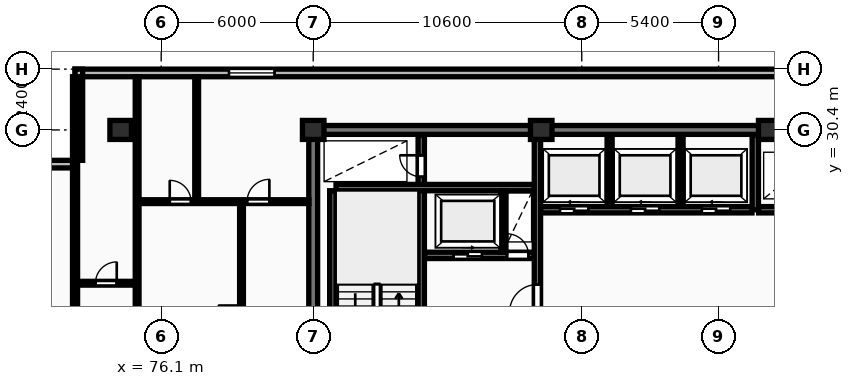
"""IFC4 building model, lengths in metres.
Left out: names, types, materials, properties, quantities, classifications, styles, units other than length and angle.
Written with IfcOpenShell. Run it as: python <this file> out.ifc"""

import sys

from ifc_helpers import new_model, si_unit, direction, frame, frame_2d, origin, origin_2d, place, context, subcontext, project, spatial, rectangle, extrude, element, fill, save


model = new_model("IFC4")
c1 = context("Model", 3, precision=1e-05, world=origin(), true_north=direction((0.0, 1.0)))
c2 = subcontext(c1, "Body", "Model", "MODEL_VIEW")
j1 = project(units=[si_unit("LENGTHUNIT", "METRE"), si_unit("PLANEANGLEUNIT", "RADIAN")], contexts=[c1])
p1 = place(None, origin())
s1 = spatial("IfcSite", under=j1, at=p1, CompositionType="ELEMENT")
p2 = place(p1, origin())
s2 = spatial("IfcBuilding", under=s1, at=p2, CompositionType="ELEMENT")
p3 = place(p2, frame((0.0, 0.0, 80.8)))
s3 = spatial("IfcBuildingStorey", under=s2, at=p3, CompositionType="ELEMENT", Elevation=80.8)
for number, where, z_axis, x_axis in (
    (1, (74.5, 30.4, 0.0), (0.0, 0.0, 1.0), (1.0, 0.0, 0.0)),
    (2, (82.1, 30.4, 0.0), (0.0, 0.0, 1.0), (1.0, 0.0, 0.0)),
    (3, (91.1, 30.4, 0.0), (0.0, 0.0, 1.0), (1.0, 0.0, 0.0)),
    (4, (100.1, 30.4, 0.0), (0.0, 0.0, 1.0), (1.0, 0.0, 0.0)),
):
    element("IfcColumn", number, at=place(p3, frame(where, z_axis=z_axis, x_axis=x_axis)), inside=s3, PredefinedType="COLUMN", context=c2, shape_type="SweptSolid", body=[
        extrude(rectangle(XDim=0.85, YDim=0.75, at=origin_2d()), origin(), (0.0, 0.0, 1.0), 3.25),
    ])
p4 = place(p3, frame((130.7, 32.65, 0.0), z_axis=(0.0, 0.0, 1.0), x_axis=(-1.0, 0.0, 0.0)))
e5 = element("IfcWall", 5, at=p4, inside=s3, PredefinedType="STANDARD", context=c2, shape_type="SweptSolid", body=[
    extrude(rectangle(XDim=58.0, YDim=0.3, at=frame_2d((29.0, 0.0))), origin(), (0.0, 0.0, 1.0), 2.97),
])
p5 = place(p4, frame((50.125, 0.0, 0.85)))
e6 = element("IfcOpeningElement", 6, at=p5, cuts=e5, PredefinedType="OPENING", context=c2, shape_type="SweptSolid", body=[
    extrude(rectangle(XDim=1.8, YDim=1.8, at=frame_2d((0.9, 0.9))), frame((0.0, 0.16, 0.0), z_axis=(0.0, -1.0, 0.0), x_axis=(1.0, 0.0, 0.0)), (0.0, 0.0, 1.0), 0.32),
])
p6 = place(p4, frame((6.775, 0.0, 0.85)))
e7 = element("IfcOpeningElement", 7, at=p6, cuts=e5, PredefinedType="OPENING", context=c2, shape_type="SweptSolid", body=[
    extrude(rectangle(XDim=1.8, YDim=1.8, at=frame_2d((0.9, 0.9))), frame((0.0, 0.16, 0.0), z_axis=(0.0, -1.0, 0.0), x_axis=(1.0, 0.0, 0.0)), (0.0, 0.0, 1.0), 0.32),
])
p7 = place(p3, frame((72.85, 32.8, 0.0), z_axis=(0.0, 0.0, 1.0), x_axis=(0.0, -1.0, 0.0)))
e8 = element("IfcWall", 8, at=p7, inside=s3, PredefinedType="STANDARD", context=c2, shape_type="SweptSolid", body=[
    extrude(rectangle(XDim=3.6, YDim=0.3, at=frame_2d((1.8, 0.0))), origin(), (0.0, 0.0, 1.0), 2.97),
])
p8 = place(p3, frame((72.7, 29.05, 0.0), z_axis=(0.0, 0.0, 1.0), x_axis=(-1.0, 0.0, 0.0)))
e9 = element("IfcWall", 9, at=p8, inside=s3, PredefinedType="STANDARD", context=c2, shape_type="SweptSolid", body=[
    extrude(rectangle(XDim=3.6, YDim=0.3, at=frame_2d((1.8, 0.0))), origin(), (0.0, 0.0, 1.0), 2.97),
])
p9 = place(p3, frame((81.925, 30.4, 0.0), z_axis=(0.0, 0.0, 1.0), x_axis=(1.0, 0.0, 0.0)))
e10 = element("IfcWall", 10, at=p9, inside=s3, PredefinedType="SHEAR", context=c2, shape_type="SweptSolid", body=[
    extrude(rectangle(XDim=36.265, YDim=0.35, at=frame_2d((18.132, 0.0))), origin(), (0.0, 0.0, 1.0), 3.25),
])
p10 = place(p3, frame((82.1, 18.575, 0.0), z_axis=(0.0, 0.0, 1.0), x_axis=(0.0, 1.0, 0.0)))
e11 = element("IfcWall", 11, at=p10, inside=s3, PredefinedType="SHEAR", context=c2, shape_type="SweptSolid", body=[
    extrude(rectangle(XDim=11.65, YDim=0.35, at=frame_2d((5.825, 0.0))), origin(), (0.0, 0.0, 1.0), 3.25),
])
p11 = place(p3, frame((82.875, 20.4, 0.0), z_axis=(0.0, 0.0, 1.0), x_axis=(0.0, 1.0, 0.0)))
e12 = element("IfcWall", 12, at=p11, inside=s3, PredefinedType="SHEAR", context=c2, shape_type="SweptSolid", body=[
    extrude(rectangle(XDim=7.6, YDim=0.25, at=frame_2d((3.8, 0.0))), origin(), (0.0, 0.0, 1.0), 3.25),
])
p12 = place(p3, frame((86.365, 18.6, 0.0), z_axis=(0.0, 0.0, 1.0), x_axis=(0.0, 1.0, 0.0)))
e13 = element("IfcWall", 13, at=p12, inside=s3, PredefinedType="SHEAR", context=c2, shape_type="SweptSolid", body=[
    extrude(rectangle(XDim=11.6, YDim=0.25, at=frame_2d((5.8, 0.0))), origin(), (0.0, 0.0, 1.0), 3.25),
])
p13 = place(p12, frame((0.45, 0.0, 0.0)))
e14 = element("IfcOpeningElement", 14, at=p13, cuts=e13, PredefinedType="OPENING", context=c2, shape_type="SweptSolid", body=[
    extrude(rectangle(XDim=0.85, YDim=2.05, at=frame_2d((0.425, 1.025))), frame((0.0, 0.135, 0.0), z_axis=(0.0, -1.0, 0.0), x_axis=(1.0, 0.0, 0.0)), (0.0, 0.0, 1.0), 0.27),
])
p14 = place(p12, frame((2.05, 0.0, 0.0)))
e15 = element("IfcOpeningElement", 15, at=p14, cuts=e13, PredefinedType="OPENING", context=c2, shape_type="SweptSolid", body=[
    extrude(rectangle(XDim=1.1, YDim=2.1, at=frame_2d((0.55, 1.05))), frame((0.0, 0.135, 0.0), z_axis=(0.0, -1.0, 0.0), x_axis=(1.0, 0.0, 0.0)), (0.0, 0.0, 1.0), 0.27),
])
p15 = place(p12, frame((9.95, 0.0, 0.0)))
e16 = element("IfcOpeningElement", 16, at=p15, cuts=e13, PredefinedType="OPENING", context=c2, shape_type="SweptSolid", body=[
    extrude(rectangle(XDim=0.85, YDim=2.05, at=frame_2d((0.425, 1.025))), frame((0.0, 0.135, 0.0), z_axis=(0.0, -1.0, 0.0), x_axis=(1.0, 0.0, 0.0)), (0.0, 0.0, 1.0), 0.27),
])
p16 = place(p3, frame((83.0, 28.125, 0.0), z_axis=(0.0, 0.0, 1.0), x_axis=(1.0, 0.0, 0.0)))
e17 = element("IfcWall", 17, at=p16, inside=s3, PredefinedType="SHEAR", context=c2, shape_type="SweptSolid", body=[
    extrude(rectangle(XDim=7.82, YDim=0.25, at=frame_2d((3.91, 0.0))), origin(), (0.0, 0.0, 1.0), 3.25),
])
p17 = place(p3, frame((86.5, 25.45, 0.0), z_axis=(0.0, 0.0, 1.0), x_axis=(1.0, 0.0, 0.0)))
e18 = element("IfcWall", 18, at=p17, inside=s3, PredefinedType="SHEAR", context=c2, shape_type="SweptSolid", body=[
    extrude(rectangle(XDim=4.32, YDim=0.25, at=frame_2d((2.16, 0.0))), origin(), (0.0, 0.0, 1.0), 3.25),
])
p18 = place(p17, frame((1.14, 0.0, 0.0)))
e19 = element("IfcOpeningElement", 19, at=p18, cuts=e18, PredefinedType="OPENING", context=c2, shape_type="SweptSolid", body=[
    extrude(rectangle(XDim=1.12, YDim=2.12, at=frame_2d((0.56, 1.06))), frame((0.0, 0.135, 0.0), z_axis=(0.0, -1.0, 0.0), x_axis=(1.0, 0.0, 0.0)), (0.0, 0.0, 1.0), 0.27),
])
p19 = place(p17, frame((3.25, 0.0, 0.0)))
e20 = element("IfcOpeningElement", 20, at=p19, cuts=e18, PredefinedType="OPENING", context=c2, shape_type="SweptSolid", body=[
    extrude(rectangle(XDim=0.85, YDim=2.05, at=frame_2d((0.425, 1.025))), frame((0.0, 0.135, 0.0), z_axis=(0.0, -1.0, 0.0), x_axis=(1.0, 0.0, 0.0)), (0.0, 0.0, 1.0), 0.27),
])
p20 = place(p3, frame((89.6, 25.58, 0.0), z_axis=(0.0, 0.0, 1.0), x_axis=(0.0, 1.0, 0.0)))
e21 = element("IfcWall", 21, at=p20, inside=s3, PredefinedType="PARTITIONING", context=c2, shape_type="SweptSolid", body=[
    extrude(rectangle(XDim=2.42, YDim=0.2, at=frame_2d((1.21, 0.0))), origin(), (0.0, 0.0, 1.0), 2.97),
])
p21 = place(p3, frame((90.95, 18.6, 0.0), z_axis=(0.0, 0.0, 1.0), x_axis=(0.0, 1.0, 0.0)))
e22 = element("IfcWall", 22, at=p21, inside=s3, PredefinedType="SHEAR", context=c2, shape_type="SweptSolid", body=[
    extrude(rectangle(XDim=11.6, YDim=0.25, at=frame_2d((5.8, 0.0))), origin(), (0.0, 0.0, 1.0), 3.25),
])
p22 = place(p21, frame((4.6, 0.0, 0.0)))
e23 = element("IfcOpeningElement", 23, at=p22, cuts=e22, PredefinedType="OPENING", context=c2, shape_type="SweptSolid", body=[
    extrude(rectangle(XDim=1.1, YDim=2.1, at=frame_2d((0.55, 1.05))), frame((0.0, 0.135, 0.0), z_axis=(0.0, -1.0, 0.0), x_axis=(1.0, 0.0, 0.0)), (0.0, 0.0, 1.0), 0.27),
])
for number, where, z_axis, x_axis in (
    (24, (93.8, 27.38, 0.0), (0.0, 0.0, 1.0), (0.0, 1.0, 0.0)),
    (25, (96.6, 27.38, 0.0), (0.0, 0.0, 1.0), (0.0, 1.0, 0.0)),
):
    element("IfcWall", number, at=place(p3, frame(where, z_axis=z_axis, x_axis=x_axis)), inside=s3, PredefinedType="PARTITIONING", context=c2, shape_type="SweptSolid", body=[
        extrude(rectangle(XDim=2.82, YDim=0.2, at=frame_2d((1.41, 0.0))), origin(), (0.0, 0.0, 1.0), 2.97),
    ])
p23 = place(p3, frame((91.08, 27.25, 0.0), z_axis=(0.0, 0.0, 1.0), x_axis=(1.0, 0.0, 0.0)))
e26 = element("IfcWall", 26, at=p23, inside=s3, PredefinedType="SHEAR", context=c2, shape_type="SweptSolid", body=[
    extrude(rectangle(XDim=8.34, YDim=0.25, at=frame_2d((4.17, 0.0))), origin(), (0.0, 0.0, 1.0), 3.25),
])
p24 = place(p23, frame((0.76, 0.0, 0.0)))
e27 = element("IfcOpeningElement", 27, at=p24, cuts=e26, PredefinedType="OPENING", context=c2, shape_type="SweptSolid", body=[
    extrude(rectangle(XDim=1.12, YDim=2.12, at=frame_2d((0.56, 1.06))), frame((0.0, 0.135, 0.0), z_axis=(0.0, -1.0, 0.0), x_axis=(1.0, 0.0, 0.0)), (0.0, 0.0, 1.0), 0.27),
])
p25 = place(p23, frame((3.56, 0.0, 0.0)))
e28 = element("IfcOpeningElement", 28, at=p25, cuts=e26, PredefinedType="OPENING", context=c2, shape_type="SweptSolid", body=[
    extrude(rectangle(XDim=1.12, YDim=2.12, at=frame_2d((0.56, 1.06))), frame((0.0, 0.135, 0.0), z_axis=(0.0, -1.0, 0.0), x_axis=(1.0, 0.0, 0.0)), (0.0, 0.0, 1.0), 0.27),
])
p26 = place(p23, frame((6.36, 0.0, 0.0)))
e29 = element("IfcOpeningElement", 29, at=p26, cuts=e26, PredefinedType="OPENING", context=c2, shape_type="SweptSolid", body=[
    extrude(rectangle(XDim=1.12, YDim=2.12, at=frame_2d((0.56, 1.06))), frame((0.0, 0.135, 0.0), z_axis=(0.0, -1.0, 0.0), x_axis=(1.0, 0.0, 0.0)), (0.0, 0.0, 1.0), 0.27),
])
p27 = place(p3, frame((99.55, 27.25, 0.0), z_axis=(0.0, 0.0, 1.0), x_axis=(0.0, 1.0, 0.0)))
e30 = element("IfcWall", 30, at=p27, inside=s3, PredefinedType="SHEAR", context=c2, shape_type="SweptSolid", body=[
    extrude(rectangle(XDim=2.95, YDim=0.25, at=frame_2d((1.475, 0.0))), origin(), (0.0, 0.0, 1.0), 3.25),
])
p28 = place(p3, frame((99.68, 27.25, 0.0), z_axis=(0.0, 0.0, 1.0), x_axis=(1.0, 0.0, 0.0)))
e31 = element("IfcWall", 31, at=p28, inside=s3, PredefinedType="SHEAR", context=c2, shape_type="SweptSolid", body=[
    extrude(rectangle(XDim=10.54, YDim=0.25, at=frame_2d((5.27, 0.0))), origin(), (0.0, 0.0, 1.0), 3.25),
])
p29 = place(p28, frame((8.92, 0.0, 0.0)))
e32 = element("IfcOpeningElement", 32, at=p29, cuts=e31, PredefinedType="OPENING", context=c2, shape_type="SweptSolid", body=[
    extrude(rectangle(XDim=0.85, YDim=2.05, at=frame_2d((0.425, 1.025))), frame((0.0, 0.135, 0.0), z_axis=(0.0, -1.0, 0.0), x_axis=(1.0, 0.0, 0.0)), (0.0, 0.0, 1.0), 0.27),
])
p30 = place(p3, frame((72.7, 18.4, 0.0), z_axis=(0.0, 0.0, 1.0), x_axis=(0.0, 1.0, 0.0)))
e33 = element("IfcWall", 33, at=p30, inside=s3, PredefinedType="PARTITIONING", context=c2, shape_type="SweptSolid", body=[
    extrude(rectangle(XDim=14.1, YDim=0.2, at=frame_2d((7.05, 0.0))), origin(), (0.0, 0.0, 1.0), 2.97),
])
p31 = place(p3, frame((72.7, 24.35, 0.0), z_axis=(0.0, 0.0, 1.0), x_axis=(1.0, 0.0, 0.0)))
e34 = element("IfcWall", 34, at=p31, inside=s3, PredefinedType="PARTITIONING", context=c2, shape_type="SweptSolid", body=[
    extrude(rectangle(XDim=2.45, YDim=0.15, at=frame_2d((1.225, 0.0))), origin(), (0.0, 0.0, 1.0), 2.97),
])
p32 = place(p31, frame((0.805, 0.0, 0.0)))
e35 = element("IfcOpeningElement", 35, at=p32, cuts=e34, PredefinedType="OPENING", context=c2, shape_type="SweptSolid", body=[
    extrude(rectangle(XDim=0.84, YDim=2.04, at=frame_2d((0.42, 1.02))), frame((0.0, 0.085, 0.0), z_axis=(0.0, -1.0, 0.0), x_axis=(1.0, 0.0, 0.0)), (0.0, 0.0, 1.0), 0.17),
])
p33 = place(p3, frame((75.15, 18.45, 0.0), z_axis=(0.0, 0.0, 1.0), x_axis=(0.0, 1.0, 0.0)))
e36 = element("IfcWall", 36, at=p33, inside=s3, PredefinedType="PARTITIONING", context=c2, shape_type="SweptSolid", body=[
    extrude(rectangle(XDim=14.05, YDim=0.15, at=frame_2d((7.025, 0.0))), origin(), (0.0, 0.0, 1.0), 2.97),
])
p34 = place(p33, frame((3.32, 0.0, 0.0)))
e37 = element("IfcOpeningElement", 37, at=p34, cuts=e36, PredefinedType="OPENING", context=c2, shape_type="SweptSolid", body=[
    extrude(rectangle(XDim=0.88, YDim=2.06, at=frame_2d((0.44, 1.03))), frame((0.0, 0.085, 0.0), z_axis=(0.0, -1.0, 0.0), x_axis=(1.0, 0.0, 0.0)), (0.0, 0.0, 1.0), 0.17),
])
p35 = place(p3, frame((79.27, 18.45, 0.0), z_axis=(0.0, 0.0, 1.0), x_axis=(0.0, 1.0, 0.0)))
e38 = element("IfcWall", 38, at=p35, inside=s3, PredefinedType="PARTITIONING", context=c2, shape_type="SweptSolid", body=[
    extrude(rectangle(XDim=9.12, YDim=0.15, at=frame_2d((4.56, 0.0))), origin(), (0.0, 0.0, 1.0), 2.97),
])
p36 = place(p35, frame((4.1, 0.0, 0.0)))
e39 = element("IfcOpeningElement", 39, at=p36, cuts=e38, PredefinedType="OPENING", context=c2, shape_type="SweptSolid", body=[
    extrude(rectangle(XDim=0.92, YDim=2.08, at=frame_2d((0.46, 1.04))), frame((0.0, 0.085, 0.0), z_axis=(0.0, -1.0, 0.0), x_axis=(1.0, 0.0, 0.0)), (0.0, 0.0, 1.0), 0.17),
])
p37 = place(p3, frame((77.5, 27.57, 0.0), z_axis=(0.0, 0.0, 1.0), x_axis=(0.0, 1.0, 0.0)))
e40 = element("IfcWall", 40, at=p37, inside=s3, PredefinedType="PARTITIONING", context=c2, shape_type="SweptSolid", body=[
    extrude(rectangle(XDim=4.93, YDim=0.15, at=frame_2d((2.465, 0.0))), origin(), (0.0, 0.0, 1.0), 2.97),
])
p38 = place(p3, frame((75.17, 27.57, 0.0), z_axis=(0.0, 0.0, 1.0), x_axis=(1.0, 0.0, 0.0)))
e41 = element("IfcWall", 41, at=p38, inside=s3, PredefinedType="PARTITIONING", context=c2, shape_type="SweptSolid", body=[
    extrude(rectangle(XDim=6.76, YDim=0.15, at=frame_2d((3.38, 0.0))), origin(), (0.0, 0.0, 1.0), 2.97),
])
p39 = place(p38, frame((1.266, 0.0, 0.0)))
e42 = element("IfcOpeningElement", 42, at=p39, cuts=e41, PredefinedType="OPENING", context=c2, shape_type="SweptSolid", body=[
    extrude(rectangle(XDim=0.84, YDim=2.04, at=frame_2d((0.42, 1.02))), frame((0.0, 0.085, 0.0), z_axis=(0.0, -1.0, 0.0), x_axis=(1.0, 0.0, 0.0)), (0.0, 0.0, 1.0), 0.17),
])
p40 = place(p38, frame((4.32, 0.0, 0.0)))
e43 = element("IfcOpeningElement", 43, at=p40, cuts=e41, PredefinedType="OPENING", context=c2, shape_type="SweptSolid", body=[
    extrude(rectangle(XDim=0.88, YDim=2.06, at=frame_2d((0.44, 1.03))), frame((0.0, 0.085, 0.0), z_axis=(0.0, -1.0, 0.0), x_axis=(1.0, 0.0, 0.0)), (0.0, 0.0, 1.0), 0.17),
])
p41 = place(p5, origin())
e44 = element("IfcWindow", 44, at=p41, inside=s3, PartitioningType="SINGLE_PANEL", PredefinedType="WINDOW", context=c2, shape_type="SweptSolid", body=[
    extrude(rectangle(XDim=1.8, YDim=1.8, at=frame_2d((0.9, 0.9))), frame((0.0, 0.03, 0.0), z_axis=(0.0, -1.0, 0.0), x_axis=(1.0, 0.0, 0.0)), (0.0, 0.0, 1.0), 0.06),
])
fill(e6, e44)
p42 = place(p15, origin())
e45 = element("IfcDoor", 45, at=p42, inside=s3, OperationType="SINGLE_SWING_RIGHT", PredefinedType="DOOR", context=c2, shape_type="SweptSolid", body=[
    extrude(rectangle(XDim=0.85, YDim=2.05, at=frame_2d((0.425, 1.025))), frame((0.0, 0.025, 0.0), z_axis=(0.0, -1.0, 0.0), x_axis=(1.0, 0.0, 0.0)), (0.0, 0.0, 1.0), 0.05),
])
fill(e16, e45)
p43 = place(p18, origin())
e46 = element("IfcDoor", 46, at=p43, inside=s3, OperationType="SLIDING_TO_RIGHT", PredefinedType="DOOR", context=c2, shape_type="SweptSolid", body=[
    extrude(rectangle(XDim=1.12, YDim=2.12, at=frame_2d((0.56, 1.06))), frame((0.0, 0.025, 0.0), z_axis=(0.0, -1.0, 0.0), x_axis=(1.0, 0.0, 0.0)), (0.0, 0.0, 1.0), 0.05),
])
fill(e19, e46)
p44 = place(p19, origin())
e47 = element("IfcDoor", 47, at=p44, inside=s3, OperationType="SINGLE_SWING_LEFT", PredefinedType="DOOR", context=c2, shape_type="SweptSolid", body=[
    extrude(rectangle(XDim=0.85, YDim=2.05, at=frame_2d((0.425, 1.025))), frame((0.0, 0.025, 0.0), z_axis=(0.0, -1.0, 0.0), x_axis=(1.0, 0.0, 0.0)), (0.0, 0.0, 1.0), 0.05),
])
fill(e20, e47)
p45 = place(p22, origin())
e48 = element("IfcDoor", 48, at=p45, inside=s3, OperationType="SINGLE_SWING_LEFT", PredefinedType="DOOR", context=c2, shape_type="SweptSolid", body=[
    extrude(rectangle(XDim=1.1, YDim=2.1, at=frame_2d((0.55, 1.05))), frame((0.0, 0.025, 0.0), z_axis=(0.0, -1.0, 0.0), x_axis=(1.0, 0.0, 0.0)), (0.0, 0.0, 1.0), 0.05),
])
fill(e23, e48)
p46 = place(p24, origin())
e49 = element("IfcDoor", 49, at=p46, inside=s3, OperationType="SLIDING_TO_LEFT", PredefinedType="DOOR", context=c2, shape_type="SweptSolid", body=[
    extrude(rectangle(XDim=1.12, YDim=2.12, at=frame_2d((0.56, 1.06))), frame((0.0, 0.025, 0.0), z_axis=(0.0, -1.0, 0.0), x_axis=(1.0, 0.0, 0.0)), (0.0, 0.0, 1.0), 0.05),
])
fill(e27, e49)
p47 = place(p25, origin())
e50 = element("IfcDoor", 50, at=p47, inside=s3, OperationType="SLIDING_TO_LEFT", PredefinedType="DOOR", context=c2, shape_type="SweptSolid", body=[
    extrude(rectangle(XDim=1.12, YDim=2.12, at=frame_2d((0.56, 1.06))), frame((0.0, 0.025, 0.0), z_axis=(0.0, -1.0, 0.0), x_axis=(1.0, 0.0, 0.0)), (0.0, 0.0, 1.0), 0.05),
])
fill(e28, e50)
p48 = place(p26, origin())
e51 = element("IfcDoor", 51, at=p48, inside=s3, OperationType="SLIDING_TO_LEFT", PredefinedType="DOOR", context=c2, shape_type="SweptSolid", body=[
    extrude(rectangle(XDim=1.12, YDim=2.12, at=frame_2d((0.56, 1.06))), frame((0.0, 0.025, 0.0), z_axis=(0.0, -1.0, 0.0), x_axis=(1.0, 0.0, 0.0)), (0.0, 0.0, 1.0), 0.05),
])
fill(e29, e51)
p49 = place(p32, origin())
e52 = element("IfcDoor", 52, at=p49, inside=s3, OperationType="SINGLE_SWING_RIGHT", PredefinedType="DOOR", context=c2, shape_type="SweptSolid", body=[
    extrude(rectangle(XDim=0.84, YDim=2.04, at=frame_2d((0.42, 1.02))), frame((0.0, 0.025, 0.0), z_axis=(0.0, -1.0, 0.0), x_axis=(1.0, 0.0, 0.0)), (0.0, 0.0, 1.0), 0.05),
])
fill(e35, e52)
p50 = place(p36, origin())
e53 = element("IfcDoor", 53, at=p50, inside=s3, OperationType="SINGLE_SWING_RIGHT", PredefinedType="DOOR", context=c2, shape_type="SweptSolid", body=[
    extrude(rectangle(XDim=0.92, YDim=2.08, at=frame_2d((0.46, 1.04))), frame((0.0, 0.025, 0.0), z_axis=(0.0, -1.0, 0.0), x_axis=(1.0, 0.0, 0.0)), (0.0, 0.0, 1.0), 0.05),
])
fill(e39, e53)
p51 = place(p39, origin())
e54 = element("IfcDoor", 54, at=p51, inside=s3, OperationType="SINGLE_SWING_LEFT", PredefinedType="DOOR", context=c2, shape_type="SweptSolid", body=[
    extrude(rectangle(XDim=0.84, YDim=2.04, at=frame_2d((0.42, 1.02))), frame((0.0, 0.025, 0.0), z_axis=(0.0, -1.0, 0.0), x_axis=(1.0, 0.0, 0.0)), (0.0, 0.0, 1.0), 0.05),
])
fill(e42, e54)
p52 = place(p40, origin())
e55 = element("IfcDoor", 55, at=p52, inside=s3, OperationType="SINGLE_SWING_RIGHT", PredefinedType="DOOR", context=c2, shape_type="SweptSolid", body=[
    extrude(rectangle(XDim=0.88, YDim=2.06, at=frame_2d((0.44, 1.03))), frame((0.0, 0.025, 0.0), z_axis=(0.0, -1.0, 0.0), x_axis=(1.0, 0.0, 0.0)), (0.0, 0.0, 1.0), 0.05),
])
fill(e43, e55)
save(model, sys.argv[1])
